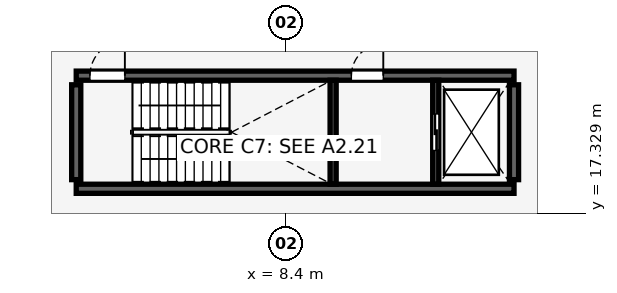
"""IFC4 building model, lengths in metres.
Left out: names, types, materials, properties, quantities, classifications, styles, units other than length and angle.
Written with IfcOpenShell. Run it as: python <this file> out.ifc"""

import sys

from ifc_helpers import new_model, si_unit, direction, frame, frame_2d, origin, place, context, subcontext, project, spatial, rectangle, extrude, element, fill, save


model = new_model("IFC4")
c1 = context("Model", 3, precision=1e-05, world=origin(), true_north=direction((0.0, 1.0)))
c2 = subcontext(c1, "Body", "Model", "MODEL_VIEW")
j1 = project(units=[si_unit("LENGTHUNIT", "METRE"), si_unit("PLANEANGLEUNIT", "RADIAN")], contexts=[c1])
p1 = place(None, origin())
s1 = spatial("IfcSite", under=j1, at=p1, CompositionType="ELEMENT")
p2 = place(p1, origin())
s2 = spatial("IfcBuilding", under=s1, at=p2, CompositionType="ELEMENT")
p3 = place(p2, frame((0.0, 0.0, 9.52)))
s3 = spatial("IfcBuildingStorey", under=s2, at=p3, CompositionType="ELEMENT", Elevation=9.52)
p4 = place(p3, frame((1.5, 18.14, 0.0), z_axis=(0.0, 0.0, 1.0), x_axis=(1.0, 0.0, 0.0)))
e1 = element("IfcWall", 1, at=p4, inside=s3, PredefinedType="SHEAR", context=c2, shape_type="SweptSolid", body=[
    extrude(rectangle(XDim=14.4, YDim=0.3, at=frame_2d((7.2, 0.0))), origin(), (0.0, 0.0, 1.0), 3.57),
])
p5 = place(p3, frame((1.5, 21.86, 0.0), z_axis=(0.0, 0.0, 1.0), x_axis=(1.0, 0.0, 0.0)))
e2 = element("IfcWall", 2, at=p5, inside=s3, PredefinedType="SHEAR", context=c2, shape_type="SweptSolid", body=[
    extrude(rectangle(XDim=14.4, YDim=0.3, at=frame_2d((7.2, 0.0))), origin(), (0.0, 0.0, 1.0), 3.57),
])
p6 = place(p5, frame((0.45, 0.0, 0.0), z_axis=(0.0, 0.0, 1.0), x_axis=(1.0, 0.0, 0.0)))
e3 = element("IfcOpeningElement", 3, at=p6, cuts=e2, PredefinedType="OPENING", context=c2, shape_type="SweptSolid", body=[
    extrude(rectangle(XDim=1.15, YDim=2.15, at=frame_2d((0.575, 1.075))), frame((0.0, 0.16, 0.0), z_axis=(0.0, -1.0, 0.0), x_axis=(1.0, 0.0, 0.0)), (0.0, 0.0, 1.0), 0.32),
])
p7 = place(p5, frame((9.05, 0.0, 0.0), z_axis=(0.0, 0.0, 1.0), x_axis=(1.0, 0.0, 0.0)))
e4 = element("IfcOpeningElement", 4, at=p7, cuts=e2, PredefinedType="OPENING", context=c2, shape_type="SweptSolid", body=[
    extrude(rectangle(XDim=1.05, YDim=2.15, at=frame_2d((0.525, 1.075))), frame((0.0, 0.16, 0.0), z_axis=(0.0, -1.0, 0.0), x_axis=(1.0, 0.0, 0.0)), (0.0, 0.0, 1.0), 0.32),
])
for number, where, z_axis, x_axis in (
    (5, (1.5, 18.44, 0.0), (0.0, 0.0, 1.0), (0.0, 1.0, 0.0)),
    (6, (15.9, 18.44, 0.0), (0.0, 0.0, 1.0), (0.0, 1.0, 0.0)),
):
    element("IfcWall", number, at=place(p3, frame(where, z_axis=z_axis, x_axis=x_axis)), inside=s3, PredefinedType="SHEAR", context=c2, shape_type="SweptSolid", body=[
        extrude(rectangle(XDim=3.12, YDim=0.3, at=frame_2d((1.56, 0.0))), origin(), (0.0, 0.0, 1.0), 3.57),
    ])
p8 = place(p3, frame((9.95, 18.29, 0.0), z_axis=(0.0, 0.0, 1.0), x_axis=(0.0, 1.0, 0.0)))
e7 = element("IfcWall", 7, at=p8, inside=s3, PredefinedType="SHEAR", context=c2, shape_type="SweptSolid", body=[
    extrude(rectangle(XDim=3.42, YDim=0.2, at=frame_2d((1.71, 0.0))), origin(), (0.0, 0.0, 1.0), 3.57),
])
p9 = place(p3, frame((13.325, 18.29, 0.0), z_axis=(0.0, 0.0, 1.0), x_axis=(0.0, 1.0, 0.0)))
e8 = element("IfcWall", 8, at=p9, inside=s3, PredefinedType="SHEAR", context=c2, shape_type="SweptSolid", body=[
    extrude(rectangle(XDim=3.42, YDim=0.2, at=frame_2d((1.71, 0.0))), origin(), (0.0, 0.0, 1.0), 3.57),
])
p10 = place(p9, frame((1.11, 0.0, 0.0), z_axis=(0.0, 0.0, 1.0), x_axis=(1.0, 0.0, 0.0)))
e9 = element("IfcOpeningElement", 9, at=p10, cuts=e8, PredefinedType="OPENING", context=c2, shape_type="SweptSolid", body=[
    extrude(rectangle(XDim=1.2, YDim=2.2, at=frame_2d((0.6, 1.1))), frame((0.0, 0.11, 0.0), z_axis=(0.0, -1.0, 0.0), x_axis=(1.0, 0.0, 0.0)), (0.0, 0.0, 1.0), 0.22),
])
p11 = place(p6, origin())
e10 = element("IfcDoor", 10, at=p11, inside=s3, OperationType="SINGLE_SWING_RIGHT", PredefinedType="DOOR", context=c2, shape_type="SweptSolid", body=[
    extrude(rectangle(XDim=1.15, YDim=2.15, at=frame_2d((0.575, 1.075))), frame((0.0, 0.025, 0.0), z_axis=(0.0, -1.0, 0.0), x_axis=(1.0, 0.0, 0.0)), (0.0, 0.0, 1.0), 0.05),
])
fill(e3, e10)
p12 = place(p7, origin())
e11 = element("IfcDoor", 11, at=p12, inside=s3, OperationType="SINGLE_SWING_RIGHT", PredefinedType="DOOR", context=c2, shape_type="SweptSolid", body=[
    extrude(rectangle(XDim=1.05, YDim=2.15, at=frame_2d((0.525, 1.075))), frame((0.0, 0.025, 0.0), z_axis=(0.0, -1.0, 0.0), x_axis=(1.0, 0.0, 0.0)), (0.0, 0.0, 1.0), 0.05),
])
fill(e4, e11)
p13 = place(p10, origin())
e12 = element("IfcDoor", 12, at=p13, inside=s3, OperationType="DOUBLE_DOOR_SLIDING", PredefinedType="DOOR", context=c2, shape_type="SweptSolid", body=[
    extrude(rectangle(XDim=1.2, YDim=2.2, at=frame_2d((0.6, 1.1))), frame((0.0, 0.025, 0.0), z_axis=(0.0, -1.0, 0.0), x_axis=(1.0, 0.0, 0.0)), (0.0, 0.0, 1.0), 0.05),
])
fill(e9, e12)
save(model, sys.argv[1])
